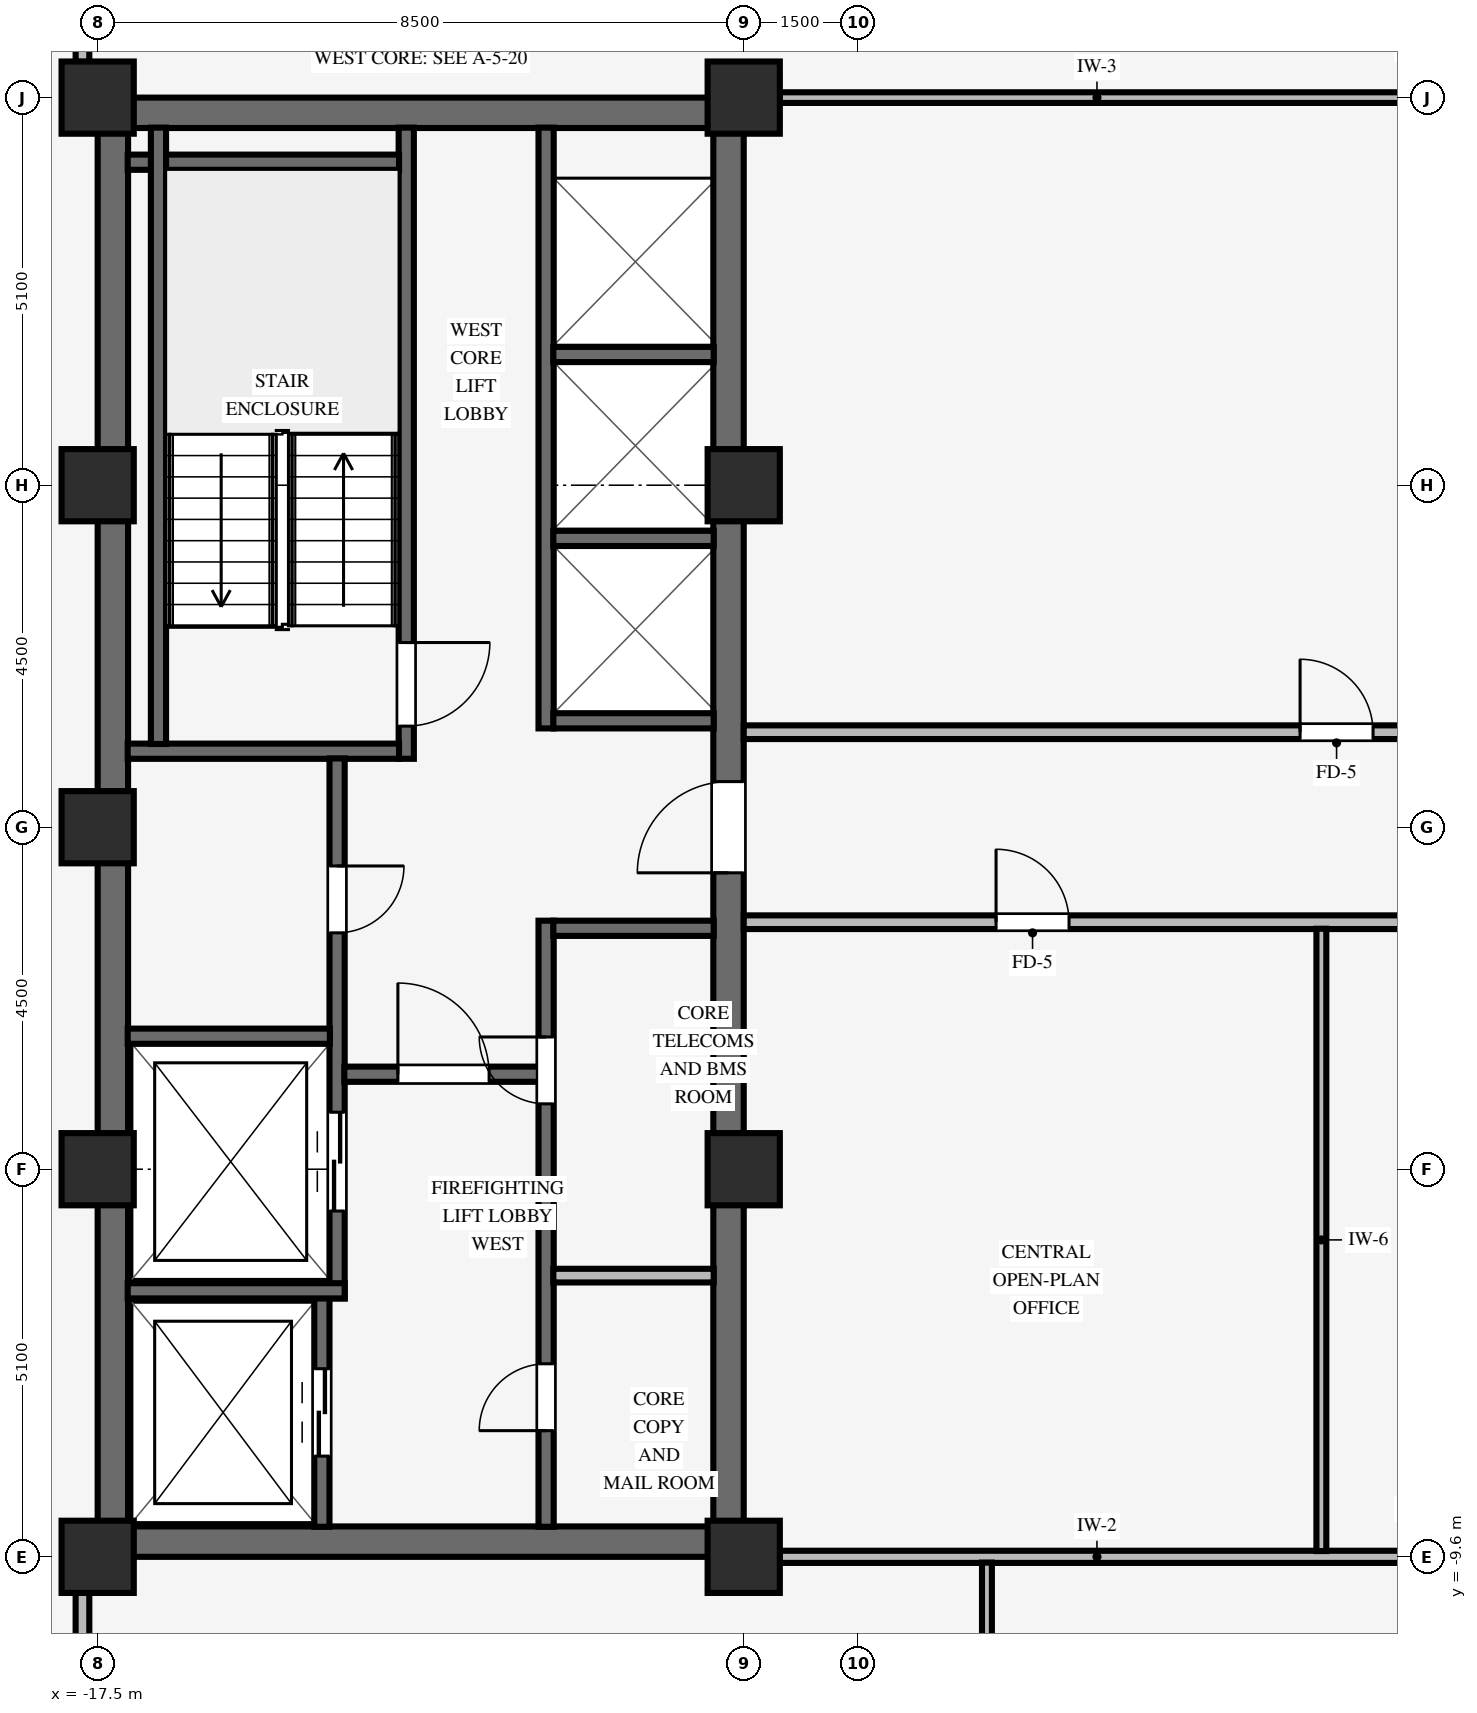
"""IFC4 building model, lengths in metres.
Left out: names, types, materials, properties, quantities, classifications, styles, units other than length and angle.
Written with IfcOpenShell. Run it as: python <this file> out.ifc"""

import sys

from ifc_helpers import new_model, si_unit, direction, frame, frame_2d, origin, origin_2d, place, context, subcontext, project, spatial, rectangle, extrude, source, transform, mapped, element, fill, save


model = new_model("IFC4")
c1 = context("Model", 3, precision=1e-05, world=origin(), true_north=direction((0.0, 1.0)))
c2 = subcontext(c1, "Body", "Model", "MODEL_VIEW")
j1 = project(units=[si_unit("LENGTHUNIT", "METRE"), si_unit("PLANEANGLEUNIT", "RADIAN")], contexts=[c1])
p1 = place(None, origin())
s1 = spatial("IfcSite", under=j1, at=p1, CompositionType="ELEMENT")
p2 = place(p1, origin())
s2 = spatial("IfcBuilding", under=s1, at=p2, CompositionType="ELEMENT")
p3 = place(p2, frame((0.0, 0.0, 156.7)))
s3 = spatial("IfcBuildingStorey", under=s2, at=p3, CompositionType="ELEMENT", Elevation=156.7)
for number, where, z_axis, x_axis in (
    (1, (-17.5, -9.4, 0.0), (0.0, 0.0, 1.0), (1.0, 0.0, 0.0)),
    (2, (-17.5, 9.4, 0.0), (0.0, 0.0, 1.0), (1.0, 0.0, 0.0)),
):
    element("IfcWall", number, at=place(p3, frame(where, z_axis=z_axis, x_axis=x_axis)), inside=s3, PredefinedType="SHEAR", context=c2, shape_type="SweptSolid", body=[
        extrude(rectangle(XDim=8.5, YDim=0.4, at=frame_2d((4.25, 0.0))), origin(), (0.0, 0.0, 1.0), 3.37),
    ])
p4 = place(p3, frame((-17.3, -9.205, 0.0), z_axis=(0.0, 0.0, 1.0), x_axis=(0.0, 1.0, 0.0)))
e3 = element("IfcWall", 3, at=p4, inside=s3, PredefinedType="SHEAR", context=c2, shape_type="SweptSolid", body=[
    extrude(rectangle(XDim=18.41, YDim=0.4, at=frame_2d((9.205, 0.0))), origin(), (0.0, 0.0, 1.0), 3.37),
])
p5 = place(p3, frame((-9.2, -9.205, 0.0), z_axis=(0.0, 0.0, 1.0), x_axis=(0.0, 1.0, 0.0)))
e4 = element("IfcWall", 4, at=p5, inside=s3, PredefinedType="SHEAR", context=c2, shape_type="SweptSolid", body=[
    extrude(rectangle(XDim=18.41, YDim=0.4, at=frame_2d((9.205, 0.0))), origin(), (0.0, 0.0, 1.0), 3.37),
])
p6 = place(p5, frame((8.605, 0.0, 0.0)))
e5 = element("IfcOpeningElement", 5, at=p6, cuts=e4, PredefinedType="OPENING", context=c2, shape_type="SweptSolid", body=[
    extrude(rectangle(XDim=1.2, YDim=2.15, at=frame_2d((0.6, 1.075))), frame((0.0, 0.21, 0.0), z_axis=(0.0, -1.0, 0.0), x_axis=(1.0, 0.0, 0.0)), (0.0, 0.0, 1.0), 0.42),
])
for number, where, z_axis, x_axis in (
    (6, (-17.5, -9.6, 0.0), (0.0, 0.0, 1.0), (1.0, 0.0, 0.0)),
    (7, (-17.5, -4.5, 0.0), (0.0, 0.0, 1.0), (1.0, 0.0, 0.0)),
    (8, (-17.5, 4.5, 0.0), (0.0, 0.0, 1.0), (1.0, 0.0, 0.0)),
    (9, (-17.5, 9.6, 0.0), (0.0, 0.0, 1.0), (1.0, 0.0, 0.0)),
    (10, (-9.0, -9.6, 0.0), (0.0, 0.0, 1.0), (1.0, 0.0, 0.0)),
    (11, (-9.0, -4.5, 0.0), (0.0, 0.0, 1.0), (1.0, 0.0, 0.0)),
    (12, (-9.0, 4.5, 0.0), (0.0, 0.0, 1.0), (1.0, 0.0, 0.0)),
    (13, (-9.0, 9.6, 0.0), (0.0, 0.0, 1.0), (1.0, 0.0, 0.0)),
    (14, (-17.5, 0.0, 0.0), (0.0, 0.0, 1.0), (1.0, 0.0, 0.0)),
):
    element("IfcColumn", number, at=place(p3, frame(where, z_axis=z_axis, x_axis=x_axis)), inside=s3, PredefinedType="COLUMN", context=c2, shape_type="SweptSolid", body=[
        extrude(rectangle(XDim=0.95, YDim=0.95, at=origin_2d()), origin(), (0.0, 0.0, 1.0), 3.37),
    ])
p7 = place(p3, frame((-13.44, 0.9, 0.0), z_axis=(0.0, 0.0, 1.0), x_axis=(0.0, 1.0, 0.0)))
e15 = element("IfcWall", 15, at=p7, inside=s3, PredefinedType="SHEAR", context=c2, shape_type="SweptSolid", body=[
    extrude(rectangle(XDim=8.305, YDim=0.2, at=frame_2d((4.153, 0.0))), origin(), (0.0, 0.0, 1.0), 3.37),
])
p8 = place(p7, frame((1.53, 0.0, 0.0), z_axis=(0.0, 0.0, 1.0), x_axis=(-1.0, 0.0, 0.0)))
e16 = element("IfcOpeningElement", 16, at=p8, cuts=e15, PredefinedType="OPENING", context=c2, shape_type="SweptSolid", body=[
    extrude(rectangle(XDim=1.1, YDim=2.15, at=frame_2d((0.55, 1.075))), frame((0.0, 0.11, 0.0), z_axis=(0.0, -1.0, 0.0), x_axis=(1.0, 0.0, 0.0)), (0.0, 0.0, 1.0), 0.22),
])
for number, where, z_axis, x_axis in (
    (17, (-17.105, 1.0, 0.0), (0.0, 0.0, 1.0), (1.0, 0.0, 0.0)),
    (18, (-17.105, 8.75, 0.0), (0.0, 0.0, 1.0), (1.0, 0.0, 0.0)),
):
    element("IfcWall", number, at=place(p3, frame(where, z_axis=z_axis, x_axis=x_axis)), inside=s3, PredefinedType="SHEAR", context=c2, shape_type="SweptSolid", body=[
        extrude(rectangle(XDim=3.57, YDim=0.2, at=frame_2d((1.785, 0.0))), origin(), (0.0, 0.0, 1.0), 3.37),
    ])
p9 = place(p3, frame((-16.7, 1.095, 0.0), z_axis=(0.0, 0.0, 1.0), x_axis=(0.0, 1.0, 0.0)))
e19 = element("IfcWall", 19, at=p9, inside=s3, PredefinedType="SHEAR", context=c2, shape_type="SweptSolid", body=[
    extrude(rectangle(XDim=8.11, YDim=0.2, at=frame_2d((4.055, 0.0))), origin(), (0.0, 0.0, 1.0), 3.37),
])
p10 = place(p3, frame((-14.55, -9.205, 0.0), z_axis=(0.0, 0.0, 1.0), x_axis=(0.0, 1.0, 0.0)))
e20 = element("IfcWall", 20, at=p10, inside=s3, PredefinedType="SHEAR", context=c2, shape_type="SweptSolid", body=[
    extrude(rectangle(XDim=3.01, YDim=0.2, at=frame_2d((1.505, 0.0))), origin(), (0.0, 0.0, 1.0), 3.37),
])
p11 = place(p10, frame((0.93, 0.0, 0.0)))
e21 = element("IfcOpeningElement", 21, at=p11, cuts=e20, PredefinedType="OPENING", context=c2, shape_type="SweptSolid", body=[
    extrude(rectangle(XDim=1.15, YDim=2.15, at=frame_2d((0.575, 1.075))), frame((0.0, 0.11, 0.0), z_axis=(0.0, -1.0, 0.0), x_axis=(1.0, 0.0, 0.0)), (0.0, 0.0, 1.0), 0.22),
])
p12 = place(p3, frame((-14.35, -6.2, 0.0), z_axis=(0.0, 0.0, 1.0), x_axis=(0.0, 1.0, 0.0)))
e22 = element("IfcWall", 22, at=p12, inside=s3, PredefinedType="SHEAR", context=c2, shape_type="SweptSolid", body=[
    extrude(rectangle(XDim=7.105, YDim=0.2, at=frame_2d((3.552, 0.0))), origin(), (0.0, 0.0, 1.0), 3.37),
])
p13 = place(p12, frame((5.69, 0.0, 0.0), z_axis=(0.0, 0.0, 1.0), x_axis=(-1.0, 0.0, 0.0)))
e23 = element("IfcOpeningElement", 23, at=p13, cuts=e22, PredefinedType="OPENING", context=c2, shape_type="SweptSolid", body=[
    extrude(rectangle(XDim=0.88, YDim=2.1, at=frame_2d((0.44, 1.05))), frame((0.0, 0.11, 0.0), z_axis=(0.0, -1.0, 0.0), x_axis=(1.0, 0.0, 0.0)), (0.0, 0.0, 1.0), 0.22),
])
p14 = place(p12, frame((1.15, 0.0, 0.0)))
e24 = element("IfcOpeningElement", 24, at=p14, cuts=e22, PredefinedType="OPENING", context=c2, shape_type="SweptSolid", body=[
    extrude(rectangle(XDim=1.3, YDim=2.2, at=frame_2d((0.65, 1.1))), frame((0.0, 0.11, 0.0), z_axis=(0.0, -1.0, 0.0), x_axis=(1.0, 0.0, 0.0)), (0.0, 0.0, 1.0), 0.22),
])
p15 = place(p3, frame((-17.105, -6.1, 0.0), z_axis=(0.0, 0.0, 1.0), x_axis=(1.0, 0.0, 0.0)))
e25 = element("IfcWall", 25, at=p15, inside=s3, PredefinedType="SHEAR", context=c2, shape_type="SweptSolid", body=[
    extrude(rectangle(XDim=2.855, YDim=0.2, at=frame_2d((1.427, 0.0))), origin(), (0.0, 0.0, 1.0), 3.37),
])
p16 = place(p3, frame((-17.105, -2.75, 0.0), z_axis=(0.0, 0.0, 1.0), x_axis=(1.0, 0.0, 0.0)))
e26 = element("IfcWall", 26, at=p16, inside=s3, PredefinedType="SHEAR", context=c2, shape_type="SweptSolid", body=[
    extrude(rectangle(XDim=2.66, YDim=0.2, at=frame_2d((1.33, 0.0))), origin(), (0.0, 0.0, 1.0), 3.37),
])
p17 = place(p3, frame((-11.6, -9.205, 0.0), z_axis=(0.0, 0.0, 1.0), x_axis=(0.0, 1.0, 0.0)))
e27 = element("IfcWall", 27, at=p17, inside=s3, PredefinedType="SHEAR", context=c2, shape_type="SweptSolid", body=[
    extrude(rectangle(XDim=7.975, YDim=0.2, at=frame_2d((3.988, 0.0))), origin(), (0.0, 0.0, 1.0), 3.37),
])
p18 = place(p17, frame((1.265, 0.0, 0.0)))
e28 = element("IfcOpeningElement", 28, at=p18, cuts=e27, PredefinedType="OPENING", context=c2, shape_type="SweptSolid", body=[
    extrude(rectangle(XDim=0.88, YDim=2.1, at=frame_2d((0.44, 1.05))), frame((0.0, 0.11, 0.0), z_axis=(0.0, -1.0, 0.0), x_axis=(1.0, 0.0, 0.0)), (0.0, 0.0, 1.0), 0.22),
])
p19 = place(p17, frame((5.565, 0.0, 0.0)))
e29 = element("IfcOpeningElement", 29, at=p19, cuts=e27, PredefinedType="OPENING", context=c2, shape_type="SweptSolid", body=[
    extrude(rectangle(XDim=0.88, YDim=2.1, at=frame_2d((0.44, 1.05))), frame((0.0, 0.11, 0.0), z_axis=(0.0, -1.0, 0.0), x_axis=(1.0, 0.0, 0.0)), (0.0, 0.0, 1.0), 0.22),
])
p20 = place(p3, frame((-14.255, -3.25, 0.0), z_axis=(0.0, 0.0, 1.0), x_axis=(1.0, 0.0, 0.0)))
e30 = element("IfcWall", 30, at=p20, inside=s3, PredefinedType="SHEAR", context=c2, shape_type="SweptSolid", body=[
    extrude(rectangle(XDim=2.56, YDim=0.2, at=frame_2d((1.28, 0.0))), origin(), (0.0, 0.0, 1.0), 3.37),
])
p21 = place(p20, frame((0.705, 0.0, 0.0)))
e31 = element("IfcOpeningElement", 31, at=p21, cuts=e30, PredefinedType="OPENING", context=c2, shape_type="SweptSolid", body=[
    extrude(rectangle(XDim=1.2, YDim=2.15, at=frame_2d((0.6, 1.075))), frame((0.0, 0.11, 0.0), z_axis=(0.0, -1.0, 0.0), x_axis=(1.0, 0.0, 0.0)), (0.0, 0.0, 1.0), 0.22),
])
p22 = place(p3, frame((-11.505, -1.33, 0.0), z_axis=(0.0, 0.0, 1.0), x_axis=(1.0, 0.0, 0.0)))
e32 = element("IfcWall", 32, at=p22, inside=s3, PredefinedType="SHEAR", context=c2, shape_type="SweptSolid", body=[
    extrude(rectangle(XDim=2.11, YDim=0.2, at=frame_2d((1.055, 0.0))), origin(), (0.0, 0.0, 1.0), 3.37),
])
p23 = place(p3, frame((-11.505, -5.9, 0.0), z_axis=(0.0, 0.0, 1.0), x_axis=(1.0, 0.0, 0.0)))
e33 = element("IfcWall", 33, at=p23, inside=s3, PredefinedType="PARTITIONING", context=c2, shape_type="SweptSolid", body=[
    extrude(rectangle(XDim=2.11, YDim=0.18, at=frame_2d((1.055, 0.0))), origin(), (0.0, 0.0, 1.0), 3.36),
])
p24 = place(p3, frame((-11.6, 1.3, 0.0), z_axis=(0.0, 0.0, 1.0), x_axis=(0.0, 1.0, 0.0)))
e34 = element("IfcWall", 34, at=p24, inside=s3, PredefinedType="SHEAR", context=c2, shape_type="SweptSolid", body=[
    extrude(rectangle(XDim=7.905, YDim=0.2, at=frame_2d((3.953, 0.0))), origin(), (0.0, 0.0, 1.0), 3.37),
])
for number, where, z_axis, x_axis in (
    (35, (-11.505, 1.4, 0.0), (0.0, 0.0, 1.0), (1.0, 0.0, 0.0)),
    (36, (-11.505, 3.8, 0.0), (0.0, 0.0, 1.0), (1.0, 0.0, 0.0)),
    (37, (-11.505, 6.22, 0.0), (0.0, 0.0, 1.0), (1.0, 0.0, 0.0)),
):
    element("IfcWall", number, at=place(p3, frame(where, z_axis=z_axis, x_axis=x_axis)), inside=s3, PredefinedType="SHEAR", context=c2, shape_type="SweptSolid", body=[
        extrude(rectangle(XDim=2.11, YDim=0.2, at=frame_2d((1.055, 0.0))), origin(), (0.0, 0.0, 1.0), 3.37),
    ])
p25 = place(p3, frame((-8.529, -9.6, 0.0), z_axis=(0.0, 0.0, 1.0), x_axis=(1.0, 0.0, 0.0)))
e38 = element("IfcWall", 38, at=p25, inside=s3, PredefinedType="PARTITIONING", context=c2, shape_type="SweptSolid", body=[
    extrude(rectangle(XDim=8.353, YDim=0.16, at=frame_2d((4.177, 0.0))), origin(), (0.0, 0.0, 1.0), 2.405),
])
p26 = place(p3, frame((-9.0, -1.25, 0.0), z_axis=(0.0, 0.0, 1.0), x_axis=(1.0, 0.0, 0.0)))
e39 = element("IfcWall", 39, at=p26, inside=s3, PredefinedType="PARTITIONING", context=c2, shape_type="SweptSolid", body=[
    extrude(rectangle(XDim=15.6, YDim=0.18, at=frame_2d((7.8, 0.0))), origin(), (0.0, 0.0, 1.0), 3.36),
])
p27 = place(p26, frame((3.32, 0.0, 0.0)))
e40 = element("IfcOpeningElement", 40, at=p27, cuts=e39, PredefinedType="OPENING", context=c2, shape_type="SweptSolid", body=[
    extrude(rectangle(XDim=0.96, YDim=2.1, at=frame_2d((0.48, 1.05))), frame((0.0, 0.1, 0.0), z_axis=(0.0, -1.0, 0.0), x_axis=(1.0, 0.0, 0.0)), (0.0, 0.0, 1.0), 0.2),
])
p28 = place(p3, frame((-9.0, 1.25, 0.0), z_axis=(0.0, 0.0, 1.0), x_axis=(1.0, 0.0, 0.0)))
e41 = element("IfcWall", 41, at=p28, inside=s3, PredefinedType="PARTITIONING", context=c2, shape_type="SweptSolid", body=[
    extrude(rectangle(XDim=15.6, YDim=0.18, at=frame_2d((7.8, 0.0))), origin(), (0.0, 0.0, 1.0), 3.36),
])
p29 = place(p28, frame((7.32, 0.0, 0.0)))
e42 = element("IfcOpeningElement", 42, at=p29, cuts=e41, PredefinedType="OPENING", context=c2, shape_type="SweptSolid", body=[
    extrude(rectangle(XDim=0.96, YDim=2.1, at=frame_2d((0.48, 1.05))), frame((0.0, 0.1, 0.0), z_axis=(0.0, -1.0, 0.0), x_axis=(1.0, 0.0, 0.0)), (0.0, 0.0, 1.0), 0.2),
])
p30 = place(p3, frame((-8.529, 9.6, 0.0), z_axis=(0.0, 0.0, 1.0), x_axis=(1.0, 0.0, 0.0)))
e43 = element("IfcWall", 43, at=p30, inside=s3, PredefinedType="PARTITIONING", context=c2, shape_type="SweptSolid", body=[
    extrude(rectangle(XDim=8.353, YDim=0.14, at=frame_2d((4.177, 0.0))), origin(), (0.0, 0.0, 1.0), 2.405),
])
for number, where, z_axis, x_axis in (
    (44, (-17.7, -13.414, 0.0), (0.0, 0.0, 1.0), (0.0, 1.0, 0.0)),
    (45, (-17.7, 10.071, 0.0), (0.0, 0.0, 1.0), (0.0, 1.0, 0.0)),
):
    element("IfcWall", number, at=place(p3, frame(where, z_axis=z_axis, x_axis=x_axis)), inside=s3, PredefinedType="PARTITIONING", context=c2, shape_type="SweptSolid", body=[
        extrude(rectangle(XDim=3.343, YDim=0.18, at=frame_2d((1.671, 0.0))), origin(), (0.0, 0.0, 1.0), 2.816),
    ])
p31 = place(p3, frame((-5.8, -13.414, 0.0), z_axis=(0.0, 0.0, 1.0), x_axis=(0.0, 1.0, 0.0)))
e46 = element("IfcWall", 46, at=p31, inside=s3, PredefinedType="PARTITIONING", context=c2, shape_type="SweptSolid", body=[
    extrude(rectangle(XDim=3.738, YDim=0.13, at=frame_2d((1.869, 0.0))), origin(), (0.0, 0.0, 1.0), 3.36),
])
p32 = place(p3, frame((-1.4, -9.524, 0.0), z_axis=(0.0, 0.0, 1.0), x_axis=(0.0, 1.0, 0.0)))
e47 = element("IfcWall", 47, at=p32, inside=s3, PredefinedType="PARTITIONING", context=c2, shape_type="SweptSolid", body=[
    extrude(rectangle(XDim=8.188, YDim=0.13, at=frame_2d((4.094, 0.0))), origin(), (0.0, 0.0, 1.0), 3.36),
])
m1 = source(origin(), c2, "Body", "SweptSolid", [
    extrude(rectangle(XDim=1.1, YDim=2.15, at=frame_2d((0.55, 1.075))), frame((0.0, 0.025, 0.0), z_axis=(0.0, -1.0, 0.0), x_axis=(1.0, 0.0, 0.0)), (0.0, 0.0, 1.0), 0.05),
])
p33 = place(p8, origin())
e48 = element("IfcDoor", 48, at=p33, inside=s3, OperationType="SINGLE_SWING_LEFT", PredefinedType="DOOR", context=c2, shape_type="MappedRepresentation", body=[
    mapped(m1, transform((0.0, 0.0, 0.0), scale=1.0)),
])
fill(e16, e48)
m2 = source(origin(), c2, "Body", "SweptSolid", [
    extrude(rectangle(XDim=0.88, YDim=2.1, at=frame_2d((0.44, 1.05))), frame((0.0, 0.025, 0.0), z_axis=(0.0, -1.0, 0.0), x_axis=(1.0, 0.0, 0.0)), (0.0, 0.0, 1.0), 0.05),
])
p34 = place(p13, origin())
e49 = element("IfcDoor", 49, at=p34, inside=s3, OperationType="SINGLE_SWING_LEFT", PredefinedType="DOOR", context=c2, shape_type="MappedRepresentation", body=[
    mapped(m2, transform((0.0, 0.0, 0.0), scale=1.0)),
])
fill(e23, e49)
m3 = source(origin(), c2, "Body", "SweptSolid", [
    extrude(rectangle(XDim=1.2, YDim=2.15, at=frame_2d((0.6, 1.075))), frame((0.0, 0.025, 0.0), z_axis=(0.0, -1.0, 0.0), x_axis=(1.0, 0.0, 0.0)), (0.0, 0.0, 1.0), 0.05),
])
p35 = place(p21, origin())
e50 = element("IfcDoor", 50, at=p35, inside=s3, OperationType="SINGLE_SWING_LEFT", PredefinedType="DOOR", context=c2, shape_type="MappedRepresentation", body=[
    mapped(m3, transform((0.0, 0.0, 0.0), scale=1.0)),
])
fill(e31, e50)
p36 = place(p18, origin())
e51 = element("IfcDoor", 51, at=p36, inside=s3, OperationType="SINGLE_SWING_LEFT", PredefinedType="DOOR", context=c2, shape_type="MappedRepresentation", body=[
    mapped(m2, transform((0.0, 0.0, 0.0), scale=1.0)),
])
fill(e28, e51)
p37 = place(p19, origin())
e52 = element("IfcDoor", 52, at=p37, inside=s3, OperationType="SINGLE_SWING_RIGHT", PredefinedType="DOOR", context=c2, shape_type="MappedRepresentation", body=[
    mapped(m2, transform((0.0, 0.0, 0.0), scale=1.0)),
])
fill(e29, e52)
p38 = place(p6, origin())
e53 = element("IfcDoor", 53, at=p38, inside=s3, OperationType="SINGLE_SWING_LEFT", PredefinedType="DOOR", context=c2, shape_type="MappedRepresentation", body=[
    mapped(m3, transform((0.0, 0.0, 0.0), scale=1.0)),
])
fill(e5, e53)
m4 = source(origin(), c2, "Body", "SweptSolid", [
    extrude(rectangle(XDim=1.15, YDim=2.15, at=frame_2d((0.575, 1.075))), frame((0.0, 0.025, 0.0), z_axis=(0.0, -1.0, 0.0), x_axis=(1.0, 0.0, 0.0)), (0.0, 0.0, 1.0), 0.05),
])
p39 = place(p11, origin())
e54 = element("IfcDoor", 54, at=p39, inside=s3, OperationType="DOUBLE_DOOR_SLIDING", PredefinedType="DOOR", context=c2, shape_type="MappedRepresentation", body=[
    mapped(m4, transform((0.0, 0.0, 0.0), scale=1.0)),
])
fill(e21, e54)
m5 = source(origin(), c2, "Body", "SweptSolid", [
    extrude(rectangle(XDim=1.3, YDim=2.2, at=frame_2d((0.65, 1.1))), frame((0.0, 0.025, 0.0), z_axis=(0.0, -1.0, 0.0), x_axis=(1.0, 0.0, 0.0)), (0.0, 0.0, 1.0), 0.05),
])
p40 = place(p14, origin())
e55 = element("IfcDoor", 55, at=p40, inside=s3, OperationType="DOUBLE_DOOR_SLIDING", PredefinedType="DOOR", context=c2, shape_type="MappedRepresentation", body=[
    mapped(m5, transform((0.0, 0.0, 0.0), scale=1.0)),
])
fill(e24, e55)
m6 = source(origin(), c2, "Body", "SweptSolid", [
    extrude(rectangle(XDim=0.96, YDim=2.1, at=frame_2d((0.48, 1.05))), frame((0.0, 0.025, 0.0), z_axis=(0.0, -1.0, 0.0), x_axis=(1.0, 0.0, 0.0)), (0.0, 0.0, 1.0), 0.05),
])
p41 = place(p29, origin())
e56 = element("IfcDoor", 56, at=p41, inside=s3, OperationType="SINGLE_SWING_LEFT", PredefinedType="DOOR", context=c2, shape_type="MappedRepresentation", body=[
    mapped(m6, transform((0.0, 0.0, 0.0), scale=1.0)),
])
fill(e42, e56)
p42 = place(p27, origin())
e57 = element("IfcDoor", 57, at=p42, inside=s3, OperationType="SINGLE_SWING_LEFT", PredefinedType="DOOR", context=c2, shape_type="MappedRepresentation", body=[
    mapped(m6, transform((0.0, 0.0, 0.0), scale=1.0)),
])
fill(e40, e57)
save(model, sys.argv[1])
